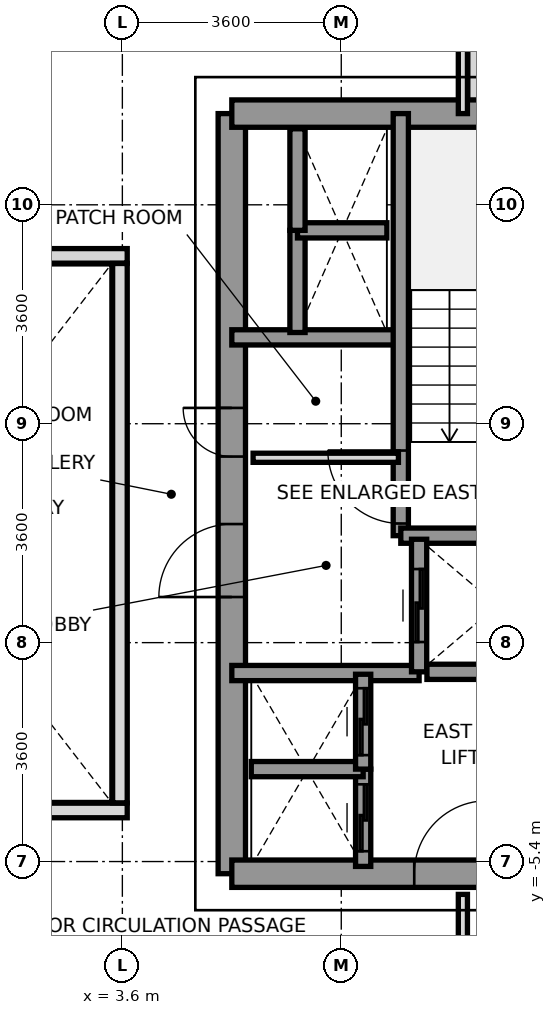
"""IFC4 building model, lengths in metres.
Left out: names, types, materials, properties, quantities, classifications, styles, units other than length and angle.
Written with IfcOpenShell. Run it as: python <this file> out.ifc"""

import sys

from ifc_helpers import new_model, si_unit, direction, frame, frame_2d, origin, place, context, subcontext, project, spatial, rectangle, extrude, source, transform, mapped, element, fill, save


model = new_model("IFC4")
c1 = context("Model", 3, precision=1e-05, world=origin(), true_north=direction((0.0, 1.0)))
c2 = subcontext(c1, "Body", "Model", "MODEL_VIEW")
j1 = project(units=[si_unit("LENGTHUNIT", "METRE"), si_unit("PLANEANGLEUNIT", "RADIAN")], contexts=[c1])
p1 = place(None, origin())
s1 = spatial("IfcSite", under=j1, at=p1, CompositionType="ELEMENT")
p2 = place(p1, origin())
s2 = spatial("IfcBuilding", under=s1, at=p2, CompositionType="ELEMENT")
p3 = place(p2, frame((0.0, 0.0, 144.8)))
s3 = spatial("IfcBuildingStorey", under=s2, at=p3, CompositionType="ELEMENT", Elevation=144.8)
p4 = place(p3, frame((9.4, 8.472, 0.0), z_axis=(0.0, 0.0, 1.0), x_axis=(0.0, -1.0, 0.0)))
e1 = element("IfcWall", 1, at=p4, inside=s3, PredefinedType="PARAPET", context=c2, shape_type="SweptSolid", body=[
    extrude(rectangle(XDim=1.519, YDim=0.24, at=frame_2d((0.76, 0.0))), origin(), (0.0, 0.0, 1.0), 1.15),
])
p5 = place(p3, frame((5.4, -5.6, 0.0), z_axis=(0.0, 0.0, 1.0), x_axis=(0.0, 1.0, 0.0)))
e2 = element("IfcWall", 2, at=p5, inside=s3, PredefinedType="SHEAR", context=c2, shape_type="SweptSolid", body=[
    extrude(rectangle(XDim=12.5, YDim=0.45, at=frame_2d((6.25, 0.0))), origin(), (0.0, 0.0, 1.0), 3.2),
])
p6 = place(p5, frame((4.55, 0.0, 0.0)))
e3 = element("IfcOpeningElement", 3, at=p6, cuts=e2, PredefinedType="OPENING", context=c2, shape_type="SweptSolid", body=[
    extrude(rectangle(XDim=1.2, YDim=2.2, at=frame_2d((0.6, 1.1))), frame((0.0, 0.235, 0.0), z_axis=(0.0, -1.0, 0.0), x_axis=(1.0, 0.0, 0.0)), (0.0, 0.0, 1.0), 0.47),
])
p7 = place(p5, frame((6.86, 0.0, 0.0)))
e4 = element("IfcOpeningElement", 4, at=p7, cuts=e2, PredefinedType="OPENING", context=c2, shape_type="SweptSolid", body=[
    extrude(rectangle(XDim=0.8, YDim=2.1, at=frame_2d((0.4, 1.05))), frame((0.0, 0.235, 0.0), z_axis=(0.0, -1.0, 0.0), x_axis=(1.0, 0.0, 0.0)), (0.0, 0.0, 1.0), 0.47),
])
p8 = place(p3, frame((5.4, 6.9, 0.0), z_axis=(0.0, 0.0, 1.0), x_axis=(1.0, 0.0, 0.0)))
e5 = element("IfcWall", 5, at=p8, inside=s3, PredefinedType="SHEAR", context=c2, shape_type="SweptSolid", body=[
    extrude(rectangle(XDim=5.981, YDim=0.45, at=frame_2d((2.991, 0.0))), origin(), (0.0, 0.0, 1.0), 3.2),
])
p9 = place(p3, frame((5.4, -5.6, 0.0), z_axis=(0.0, 0.0, 1.0), x_axis=(1.0, 0.0, 0.0)))
e6 = element("IfcWall", 6, at=p9, inside=s3, PredefinedType="SHEAR", context=c2, shape_type="SweptSolid", body=[
    extrude(rectangle(XDim=7.8, YDim=0.45, at=frame_2d((3.9, 0.0))), origin(), (0.0, 0.0, 1.0), 3.2),
])
p10 = place(p9, frame((3.0, 0.0, 0.0)))
e7 = element("IfcOpeningElement", 7, at=p10, cuts=e6, PredefinedType="OPENING", context=c2, shape_type="SweptSolid", body=[
    extrude(rectangle(XDim=1.2, YDim=2.2, at=frame_2d((0.6, 1.1))), frame((0.0, 0.235, 0.0), z_axis=(0.0, -1.0, 0.0), x_axis=(1.0, 0.0, 0.0)), (0.0, 0.0, 1.0), 0.47),
])
p11 = place(p3, frame((5.4, 3.22, 0.0), z_axis=(0.0, 0.0, 1.0), x_axis=(1.0, 0.0, 0.0)))
e8 = element("IfcWall", 8, at=p11, inside=s3, PredefinedType="SOLIDWALL", context=c2, shape_type="SweptSolid", body=[
    extrude(rectangle(XDim=2.78, YDim=0.25, at=frame_2d((1.39, 0.0))), origin(), (0.0, 0.0, 1.0), 3.2),
])
p12 = place(p3, frame((5.4, -2.3, 0.0), z_axis=(0.0, 0.0, 1.0), x_axis=(1.0, 0.0, 0.0)))
e9 = element("IfcWall", 9, at=p12, inside=s3, PredefinedType="SOLIDWALL", context=c2, shape_type="SweptSolid", body=[
    extrude(rectangle(XDim=3.08, YDim=0.25, at=frame_2d((1.54, 0.0))), origin(), (0.0, 0.0, 1.0), 3.2),
])
p13 = place(p3, frame((8.179, -0.041, 0.0), z_axis=(0.0, 0.0, 1.0), x_axis=(0.0, 1.0, 0.0)))
e10 = element("IfcWall", 10, at=p13, inside=s3, PredefinedType="SOLIDWALL", context=c2, shape_type="SweptSolid", body=[
    extrude(rectangle(XDim=6.941, YDim=0.25, at=frame_2d((3.47, 0.0))), origin(), (0.0, 0.0, 1.0), 3.2),
])
p14 = place(p13, frame((0.2, 0.0, 0.0)))
e11 = element("IfcOpeningElement", 11, at=p14, cuts=e10, PredefinedType="OPENING", context=c2, shape_type="SweptSolid", body=[
    extrude(rectangle(XDim=1.2, YDim=2.2, at=frame_2d((0.6, 1.1))), frame((0.0, 0.135, 0.0), z_axis=(0.0, -1.0, 0.0), x_axis=(1.0, 0.0, 0.0)), (0.0, 0.0, 1.0), 0.27),
])
p15 = place(p3, frame((8.179, -0.041, 0.0), z_axis=(0.0, 0.0, 1.0), x_axis=(1.0, 0.0, 0.0)))
e12 = element("IfcWall", 12, at=p15, inside=s3, PredefinedType="SOLIDWALL", context=c2, shape_type="SweptSolid", body=[
    extrude(rectangle(XDim=3.202, YDim=0.25, at=frame_2d((1.601, 0.0))), origin(), (0.0, 0.0, 1.0), 3.2),
])
p16 = place(p3, frame((8.48, -2.28, 0.0), z_axis=(0.0, 0.0, 1.0), x_axis=(0.0, 1.0, 0.0)))
e13 = element("IfcWall", 13, at=p16, inside=s3, PredefinedType="SOLIDWALL", context=c2, shape_type="SweptSolid", body=[
    extrude(rectangle(XDim=2.18, YDim=0.25, at=frame_2d((1.09, 0.0))), origin(), (0.0, 0.0, 1.0), 3.2),
])
p17 = place(p16, frame((0.49, 0.0, 0.0)))
e14 = element("IfcOpeningElement", 14, at=p17, cuts=e13, PredefinedType="OPENING", context=c2, shape_type="SweptSolid", body=[
    extrude(rectangle(XDim=1.2, YDim=2.2, at=frame_2d((0.6, 1.1))), frame((0.0, 0.135, 0.0), z_axis=(0.0, -1.0, 0.0), x_axis=(1.0, 0.0, 0.0)), (0.0, 0.0, 1.0), 0.27),
])
p18 = place(p3, frame((8.609, -2.28, 0.0), z_axis=(0.0, 0.0, 1.0), x_axis=(1.0, 0.0, 0.0)))
e15 = element("IfcWall", 15, at=p18, inside=s3, PredefinedType="SOLIDWALL", context=c2, shape_type="SweptSolid", body=[
    extrude(rectangle(XDim=2.312, YDim=0.25, at=frame_2d((1.156, 0.0))), origin(), (0.0, 0.0, 1.0), 3.2),
])
p19 = place(p3, frame((7.56, -5.48, 0.0), z_axis=(0.0, 0.0, 1.0), x_axis=(0.0, 1.0, 0.0)))
e16 = element("IfcWall", 16, at=p19, inside=s3, PredefinedType="SOLIDWALL", context=c2, shape_type="SweptSolid", body=[
    extrude(rectangle(XDim=1.6, YDim=0.25, at=frame_2d((0.8, 0.0))), origin(), (0.0, 0.0, 1.0), 3.2),
])
p20 = place(p19, frame((0.25, 0.0, 0.0)))
e17 = element("IfcOpeningElement", 17, at=p20, cuts=e16, PredefinedType="OPENING", context=c2, shape_type="SweptSolid", body=[
    extrude(rectangle(XDim=1.1, YDim=2.2, at=frame_2d((0.55, 1.1))), frame((0.0, 0.135, 0.0), z_axis=(0.0, -1.0, 0.0), x_axis=(1.0, 0.0, 0.0)), (0.0, 0.0, 1.0), 0.27),
])
p21 = place(p3, frame((5.72, -3.88, 0.0), z_axis=(0.0, 0.0, 1.0), x_axis=(1.0, 0.0, 0.0)))
e18 = element("IfcWall", 18, at=p21, inside=s3, PredefinedType="SOLIDWALL", context=c2, shape_type="SweptSolid", body=[
    extrude(rectangle(XDim=1.84, YDim=0.25, at=frame_2d((0.92, 0.0))), origin(), (0.0, 0.0, 1.0), 3.2),
])
p22 = place(p3, frame((7.56, -3.88, 0.0), z_axis=(0.0, 0.0, 1.0), x_axis=(0.0, 1.0, 0.0)))
e19 = element("IfcWall", 19, at=p22, inside=s3, PredefinedType="SOLIDWALL", context=c2, shape_type="SweptSolid", body=[
    extrude(rectangle(XDim=1.56, YDim=0.25, at=frame_2d((0.78, 0.0))), origin(), (0.0, 0.0, 1.0), 3.2),
])
p23 = place(p22, frame((0.23, 0.0, 0.0)))
e20 = element("IfcOpeningElement", 20, at=p23, cuts=e19, PredefinedType="OPENING", context=c2, shape_type="SweptSolid", body=[
    extrude(rectangle(XDim=1.1, YDim=2.2, at=frame_2d((0.55, 1.1))), frame((0.0, 0.135, 0.0), z_axis=(0.0, -1.0, 0.0), x_axis=(1.0, 0.0, 0.0)), (0.0, 0.0, 1.0), 0.27),
])
p24 = place(p3, frame((6.48, 3.3, 0.0), z_axis=(0.0, 0.0, 1.0), x_axis=(0.0, 1.0, 0.0)))
e21 = element("IfcWall", 21, at=p24, inside=s3, PredefinedType="SOLIDWALL", context=c2, shape_type="SweptSolid", body=[
    extrude(rectangle(XDim=1.68, YDim=0.25, at=frame_2d((0.84, 0.0))), origin(), (0.0, 0.0, 1.0), 3.2),
])
p25 = place(p3, frame((6.48, 4.98, 0.0), z_axis=(0.0, 0.0, 1.0), x_axis=(1.0, 0.0, 0.0)))
e22 = element("IfcWall", 22, at=p25, inside=s3, PredefinedType="SOLIDWALL", context=c2, shape_type="SweptSolid", body=[
    extrude(rectangle(XDim=1.47, YDim=0.25, at=frame_2d((0.735, 0.0))), origin(), (0.0, 0.0, 1.0), 3.2),
])
p26 = place(p3, frame((6.48, 4.98, 0.0), z_axis=(0.0, 0.0, 1.0), x_axis=(0.0, 1.0, 0.0)))
e23 = element("IfcWall", 23, at=p26, inside=s3, PredefinedType="SOLIDWALL", context=c2, shape_type="SweptSolid", body=[
    extrude(rectangle(XDim=1.67, YDim=0.25, at=frame_2d((0.835, 0.0))), origin(), (0.0, 0.0, 1.0), 3.2),
])
p27 = place(p3, frame((5.75, 1.24, 0.0), z_axis=(0.0, 0.0, 1.0), x_axis=(1.0, 0.0, 0.0)))
e24 = element("IfcWall", 24, at=p27, inside=s3, PredefinedType="PARTITIONING", context=c2, shape_type="SweptSolid", body=[
    extrude(rectangle(XDim=2.39, YDim=0.15, at=frame_2d((1.195, 0.0))), origin(), (0.0, 0.0, 1.0), 2.3),
])
p28 = place(p3, frame((9.2, 6.9, 0.0), z_axis=(0.0, 0.0, 1.0), x_axis=(0.0, 1.0, 0.0)))
e25 = element("IfcWall", 25, at=p28, inside=s3, PredefinedType="PARTITIONING", context=c2, shape_type="SweptSolid", body=[
    extrude(rectangle(XDim=8.78, YDim=0.15, at=frame_2d((4.39, 0.0))), origin(), (0.0, 0.0, 1.0), 2.7),
])
p29 = place(p3, frame((9.2, -15.68, 0.0), z_axis=(0.0, 0.0, 1.0), x_axis=(0.0, 1.0, 0.0)))
e26 = element("IfcWall", 26, at=p29, inside=s3, PredefinedType="PARTITIONING", context=c2, shape_type="SweptSolid", body=[
    extrude(rectangle(XDim=9.74, YDim=0.15, at=frame_2d((4.87, 0.0))), origin(), (0.0, 0.0, 1.0), 2.7),
])
for number, where, z_axis, x_axis in (
    (27, (-3.68, -4.56, 0.0), (0.0, 0.0, 1.0), (1.0, 0.0, 0.0)),
    (28, (-3.68, 4.56, 0.0), (0.0, 0.0, 1.0), (1.0, 0.0, 0.0)),
):
    element("IfcWall", number, at=place(p3, frame(where, z_axis=z_axis, x_axis=x_axis)), inside=s3, PredefinedType="PARAPET", context=c2, shape_type="SweptSolid", body=[
        extrude(rectangle(XDim=7.36, YDim=0.24, at=frame_2d((3.68, 0.0))), origin(), (0.0, 0.0, 1.0), 1.15),
    ])
p30 = place(p3, frame((3.56, -4.435, 0.0), z_axis=(0.0, 0.0, 1.0), x_axis=(0.0, 1.0, 0.0)))
e29 = element("IfcWall", 29, at=p30, inside=s3, PredefinedType="PARAPET", context=c2, shape_type="SweptSolid", body=[
    extrude(rectangle(XDim=8.87, YDim=0.24, at=frame_2d((4.435, 0.0))), origin(), (0.0, 0.0, 1.0), 1.15),
])
m1 = source(origin(), c2, "Body", "SweptSolid", [
    extrude(rectangle(XDim=1.2, YDim=2.2, at=frame_2d((0.6, 1.1))), frame((0.0, 0.025, 0.0), z_axis=(0.0, -1.0, 0.0), x_axis=(1.0, 0.0, 0.0)), (0.0, 0.0, 1.0), 0.05),
])
p31 = place(p14, origin())
e30 = element("IfcDoor", 30, at=p31, inside=s3, OperationType="SINGLE_SWING_RIGHT", PredefinedType="DOOR", context=c2, shape_type="MappedRepresentation", body=[
    mapped(m1, transform((0.0, 0.0, 0.0), x_axis=(1.0, 0.0, 0.0), y_axis=(0.0, 1.0, 0.0), z_axis=(0.0, 0.0, 1.0), scale=1.0)),
])
fill(e11, e30)
p32 = place(p6, origin())
e31 = element("IfcDoor", 31, at=p32, inside=s3, OperationType="SINGLE_SWING_LEFT", PredefinedType="DOOR", context=c2, shape_type="MappedRepresentation", body=[
    mapped(m1, transform((0.0, 0.0, 0.0), x_axis=(1.0, 0.0, 0.0), y_axis=(0.0, 1.0, 0.0), z_axis=(0.0, 0.0, 1.0), scale=1.0)),
])
fill(e3, e31)
p33 = place(p10, origin())
e32 = element("IfcDoor", 32, at=p33, inside=s3, OperationType="SINGLE_SWING_RIGHT", PredefinedType="DOOR", context=c2, shape_type="MappedRepresentation", body=[
    mapped(m1, transform((0.0, 0.0, 0.0), x_axis=(1.0, 0.0, 0.0), y_axis=(0.0, 1.0, 0.0), z_axis=(0.0, 0.0, 1.0), scale=1.0)),
])
fill(e7, e32)
m2 = source(origin(), c2, "Body", "SweptSolid", [
    extrude(rectangle(XDim=0.8, YDim=2.1, at=frame_2d((0.4, 1.05))), frame((0.0, 0.025, 0.0), z_axis=(0.0, -1.0, 0.0), x_axis=(1.0, 0.0, 0.0)), (0.0, 0.0, 1.0), 0.05),
])
p34 = place(p7, origin())
e33 = element("IfcDoor", 33, at=p34, inside=s3, OperationType="SINGLE_SWING_RIGHT", PredefinedType="DOOR", context=c2, shape_type="MappedRepresentation", body=[
    mapped(m2, transform((0.0, 0.0, 0.0), x_axis=(1.0, 0.0, 0.0), y_axis=(0.0, 1.0, 0.0), z_axis=(0.0, 0.0, 1.0), scale=1.0)),
])
fill(e4, e33)
p35 = place(p17, origin())
e34 = element("IfcDoor", 34, at=p35, inside=s3, OperationType="SLIDING_TO_RIGHT", PredefinedType="DOOR", context=c2, shape_type="MappedRepresentation", body=[
    mapped(m1, transform((0.0, 0.0, 0.0), x_axis=(1.0, 0.0, 0.0), y_axis=(0.0, 1.0, 0.0), z_axis=(0.0, 0.0, 1.0), scale=1.0)),
])
fill(e14, e34)
m3 = source(origin(), c2, "Body", "SweptSolid", [
    extrude(rectangle(XDim=1.1, YDim=2.2, at=frame_2d((0.55, 1.1))), frame((0.0, 0.025, 0.0), z_axis=(0.0, -1.0, 0.0), x_axis=(1.0, 0.0, 0.0)), (0.0, 0.0, 1.0), 0.05),
])
p36 = place(p20, origin())
e35 = element("IfcDoor", 35, at=p36, inside=s3, OperationType="SLIDING_TO_LEFT", PredefinedType="DOOR", context=c2, shape_type="MappedRepresentation", body=[
    mapped(m3, transform((0.0, 0.0, 0.0), x_axis=(1.0, 0.0, 0.0), y_axis=(0.0, 1.0, 0.0), z_axis=(0.0, 0.0, 1.0), scale=1.0)),
])
fill(e17, e35)
p37 = place(p23, origin())
e36 = element("IfcDoor", 36, at=p37, inside=s3, OperationType="SLIDING_TO_LEFT", PredefinedType="DOOR", context=c2, shape_type="MappedRepresentation", body=[
    mapped(m3, transform((0.0, 0.0, 0.0), x_axis=(1.0, 0.0, 0.0), y_axis=(0.0, 1.0, 0.0), z_axis=(0.0, 0.0, 1.0), scale=1.0)),
])
fill(e20, e36)
save(model, sys.argv[1])
